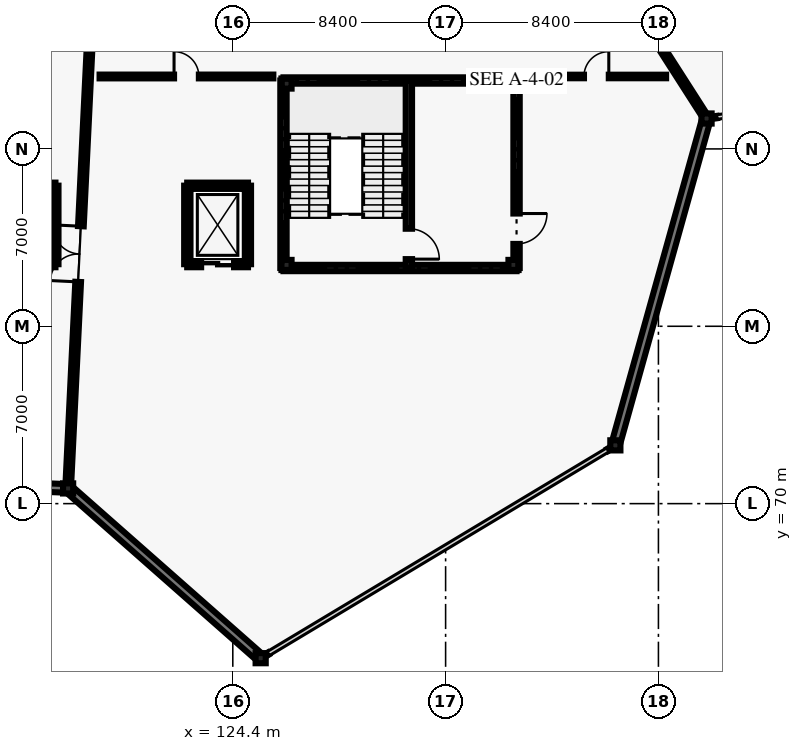
"""IFC4 building model, lengths in metres.
Left out: names, types, materials, properties, quantities, classifications, styles, units other than length and angle.
Written with IfcOpenShell. Run it as: python <this file> out.ifc"""

import sys

from ifc_helpers import new_model, si_unit, direction, frame, frame_2d, origin, origin_2d, place, context, subcontext, project, spatial, rectangle, i_section, extrude, element, fill, save


model = new_model("IFC4")
c1 = context("Model", 3, precision=1e-05, world=origin(), true_north=direction((0.0, 1.0)))
c2 = subcontext(c1, "Body", "Model", "MODEL_VIEW")
j1 = project(units=[si_unit("LENGTHUNIT", "METRE"), si_unit("PLANEANGLEUNIT", "RADIAN")], contexts=[c1])
p1 = place(None, origin())
s1 = spatial("IfcSite", under=j1, at=p1, CompositionType="ELEMENT")
p2 = place(p1, origin())
s2 = spatial("IfcBuilding", under=s1, at=p2, CompositionType="ELEMENT")
p3 = place(p2, frame((0.0, 0.0, 5.4)))
s3 = spatial("IfcBuildingStorey", under=s2, at=p3, CompositionType="ELEMENT", Elevation=5.4)
for number, where, z_axis, x_axis in (
    (1, (117.9, 70.6, 0.0), (0.0, 0.0, 1.0), (1.0, 0.0, 0.0)),
    (2, (125.5, 63.9, 0.0), (0.0, 0.0, 1.0), (1.0, 0.0, 0.0)),
    (3, (139.5, 72.3, 0.0), (0.0, 0.0, 1.0), (1.0, 0.0, 0.0)),
    (4, (143.1, 85.2, 0.0), (0.0, 0.0, 1.0), (1.0, 0.0, 0.0)),
    (5, (126.52, 79.42, 0.0), (0.0, 0.0, 1.0), (1.0, 0.0, 0.0)),
    (6, (135.48, 79.42, 0.0), (0.0, 0.0, 1.0), (1.0, 0.0, 0.0)),
    (7, (135.48, 86.58, 0.0), (0.0, 0.0, 1.0), (1.0, 0.0, 0.0)),
    (8, (126.52, 86.58, 0.0), (0.0, 0.0, 1.0), (1.0, 0.0, 0.0)),
):
    element("IfcColumn", number, at=place(p3, frame(where, z_axis=z_axis, x_axis=x_axis)), inside=s3, PredefinedType="COLUMN", context=c2, shape_type="SweptSolid", body=[
        extrude(i_section(OverallWidth=0.4, OverallDepth=0.4, WebThickness=0.022, FlangeThickness=0.036, at=origin_2d()), origin(), (0.0, 0.0, 1.0), 4.8),
    ])
p4 = place(p3, frame((117.84, 70.602, 0.0), z_axis=(0.0, 0.0, 1.0), x_axis=(-0.999284381651, 0.037824920194, 0.0)))
e9 = element("IfcWall", 9, at=p4, inside=s3, PredefinedType="SOLIDWALL", context=c2, shape_type="SweptSolid", body=[
    extrude(rectangle(XDim=18.453, YDim=0.34, at=frame_2d((9.227, 0.0))), origin(), (0.0, 0.0, 1.0), 3.62),
])
p5 = place(p3, frame((125.5, 63.9, 0.0), z_axis=(0.0, 0.0, 1.0), x_axis=(-0.750131359252, 0.661288850554, 0.0)))
e10 = element("IfcWall", 10, at=p5, inside=s3, PredefinedType="SOLIDWALL", context=c2, shape_type="SweptSolid", body=[
    extrude(rectangle(XDim=10.072, YDim=0.34, at=frame_2d((5.036, 0.0))), origin(), (0.0, 0.0, 1.0), 3.62),
])
for number, where, z_axis, x_axis in (
    (11, (139.464, 72.278, 0.0), (0.0, 0.0, 1.0), (-0.858, -0.513, 0.0)),
    (12, (125.8, 64.08, 0.0), (0.0, 0.0, 1.0), (-0.858, -0.513, 0.0)),
):
    element("IfcWall", number, at=place(p3, frame(where, z_axis=z_axis, x_axis=x_axis)), inside=s3, PredefinedType="SOLIDWALL", context=c2, shape_type="SweptSolid", body=[
        extrude(rectangle(XDim=0.308, YDim=0.095, at=frame_2d((0.154, 0.0))), origin(), (0.0, 0.0, 1.0), 3.62),
    ])
p6 = place(p3, frame((143.084, 85.142, 0.0), z_axis=(0.0, 0.0, 1.0), x_axis=(-0.268810029922, -0.963193214165, 0.0)))
e13 = element("IfcWall", 13, at=p6, inside=s3, PredefinedType="SOLIDWALL", context=c2, shape_type="SweptSolid", body=[
    extrude(rectangle(XDim=13.333, YDim=0.34, at=frame_2d((6.667, 0.0))), origin(), (0.0, 0.0, 1.0), 3.62),
])
p7 = place(p3, frame((143.506, 85.257, 0.0), z_axis=(0.0, 0.0, 1.0), x_axis=(-0.990232667812, -0.139424759628, 0.0)))
e14 = element("IfcWall", 14, at=p7, inside=s3, PredefinedType="SOLIDWALL", context=c2, shape_type="SweptSolid", body=[
    extrude(rectangle(XDim=0.308, YDim=0.095, at=frame_2d((0.154, 0.0))), origin(), (0.0, 0.0, 1.0), 3.62),
])
p8 = place(p3, frame((117.9, 70.6, 0.0), z_axis=(0.0, 0.0, 1.0), x_axis=(0.048599072515, 0.998818366947, 0.0)))
e15 = element("IfcWall", 15, at=p8, inside=s3, PredefinedType="SOLIDWALL", context=c2, shape_type="SweptSolid", body=[
    extrude(rectangle(XDim=18.522, YDim=0.225, at=frame_2d((9.261, 0.0))), origin(), (0.0, 0.0, 1.0), 4.02),
])
p9 = place(p8, frame((8.161, 0.0, 0.0)))
e16 = element("IfcOpeningElement", 16, at=p9, cuts=e15, PredefinedType="OPENING", context=c2, shape_type="SweptSolid", body=[
    extrude(rectangle(XDim=2.2, YDim=2.6, at=frame_2d((1.1, 1.3))), frame((0.0, 0.123, 0.0), z_axis=(0.0, -1.0, 0.0), x_axis=(1.0, 0.0, 0.0)), (0.0, 0.0, 1.0), 0.245),
])
p10 = place(p3, frame((143.1, 85.2, 0.0), z_axis=(0.0, 0.0, 1.0), x_axis=(-0.539434641352, 0.842027474439, 0.0)))
e17 = element("IfcWall", 17, at=p10, inside=s3, PredefinedType="SOLIDWALL", context=c2, shape_type="SweptSolid", body=[
    extrude(rectangle(XDim=15.201, YDim=0.225, at=frame_2d((7.601, 0.0))), origin(), (0.0, 0.0, 1.0), 4.02),
])
p11 = place(p10, frame((6.501, 0.0, 0.0)))
e18 = element("IfcOpeningElement", 18, at=p11, cuts=e17, PredefinedType="OPENING", context=c2, shape_type="SweptSolid", body=[
    extrude(rectangle(XDim=2.2, YDim=2.6, at=frame_2d((1.1, 1.3))), frame((0.0, 0.123, 0.0), z_axis=(0.0, -1.0, 0.0), x_axis=(1.0, 0.0, 0.0)), (0.0, 0.0, 1.0), 0.245),
])
p12 = place(p3, frame((119.142, 86.859, 0.0), z_axis=(0.0, 0.0, 1.0), x_axis=(1.0, 0.0, 0.0)))
e19 = element("IfcWall", 19, at=p12, inside=s3, PredefinedType="PARTITIONING", context=c2, shape_type="SweptSolid", body=[
    extrude(rectangle(XDim=6.858, YDim=0.15, at=frame_2d((3.429, 0.0))), origin(), (0.0, 0.0, 1.0), 3.32),
])
p13 = place(p12, frame((2.939, 0.0, 0.0)))
e20 = element("IfcOpeningElement", 20, at=p13, cuts=e19, PredefinedType="OPENING", context=c2, shape_type="SweptSolid", body=[
    extrude(rectangle(XDim=0.98, YDim=2.15, at=frame_2d((0.49, 1.075))), frame((0.0, 0.085, 0.0), z_axis=(0.0, -1.0, 0.0), x_axis=(1.0, 0.0, 0.0)), (0.0, 0.0, 1.0), 0.17),
])
p14 = place(p3, frame((136.0, 86.859, 0.0), z_axis=(0.0, 0.0, 1.0), x_axis=(1.0, 0.0, 0.0)))
e21 = element("IfcWall", 21, at=p14, inside=s3, PredefinedType="PARTITIONING", context=c2, shape_type="SweptSolid", body=[
    extrude(rectangle(XDim=5.503, YDim=0.14, at=frame_2d((2.751, 0.0))), origin(), (0.0, 0.0, 1.0), 3.32),
])
p15 = place(p14, frame((2.261, 0.0, 0.0)))
e22 = element("IfcOpeningElement", 22, at=p15, cuts=e21, PredefinedType="OPENING", context=c2, shape_type="SweptSolid", body=[
    extrude(rectangle(XDim=0.98, YDim=2.15, at=frame_2d((0.49, 1.075))), frame((0.0, 0.08, 0.0), z_axis=(0.0, -1.0, 0.0), x_axis=(1.0, 0.0, 0.0)), (0.0, 0.0, 1.0), 0.16),
])
p16 = place(p3, frame((126.4, 79.3, 0.0), z_axis=(0.0, 0.0, 1.0), x_axis=(0.0, 1.0, 0.0)))
e23 = element("IfcWall", 23, at=p16, inside=s3, PredefinedType="SHEAR", context=c2, shape_type="SweptSolid", body=[
    extrude(rectangle(XDim=7.4, YDim=0.25, at=frame_2d((3.7, 0.0))), origin(), (0.0, 0.0, 1.0), 4.56),
])
for number, where, z_axis, x_axis in (
    (24, (126.4, 86.7, 0.0), (0.0, 0.0, 1.0), (1.0, 0.0, 0.0)),
    (25, (135.6, 79.3, 0.0), (0.0, 0.0, 1.0), (-1.0, 0.0, 0.0)),
):
    element("IfcWall", number, at=place(p3, frame(where, z_axis=z_axis, x_axis=x_axis)), inside=s3, PredefinedType="SHEAR", context=c2, shape_type="SweptSolid", body=[
        extrude(rectangle(XDim=9.2, YDim=0.25, at=frame_2d((4.6, 0.0))), origin(), (0.0, 0.0, 1.0), 4.56),
    ])
p17 = place(p3, frame((135.6, 86.7, 0.0), z_axis=(0.0, 0.0, 1.0), x_axis=(0.0, -1.0, 0.0)))
e26 = element("IfcWall", 26, at=p17, inside=s3, PredefinedType="SHEAR", context=c2, shape_type="SweptSolid", body=[
    extrude(rectangle(XDim=7.4, YDim=0.25, at=frame_2d((3.7, 0.0))), origin(), (0.0, 0.0, 1.0), 4.56),
])
p18 = place(p17, frame((5.25, 0.0, 0.0)))
e27 = element("IfcOpeningElement", 27, at=p18, cuts=e26, PredefinedType="OPENING", context=c2, shape_type="SweptSolid", body=[
    extrude(rectangle(XDim=1.2, YDim=2.2, at=frame_2d((0.6, 1.1))), frame((0.0, 0.135, 0.0), z_axis=(0.0, -1.0, 0.0), x_axis=(1.0, 0.0, 0.0)), (0.0, 0.0, 1.0), 0.27),
])
p19 = place(p3, frame((131.35, 86.7, 0.0), z_axis=(0.0, 0.0, 1.0), x_axis=(0.0, -1.0, 0.0)))
e28 = element("IfcWall", 28, at=p19, inside=s3, PredefinedType="SHEAR", context=c2, shape_type="SweptSolid", body=[
    extrude(rectangle(XDim=7.4, YDim=0.25, at=frame_2d((3.7, 0.0))), origin(), (0.0, 0.0, 1.0), 4.56),
])
p20 = place(p19, frame((5.85, 0.0, 0.0)))
e29 = element("IfcOpeningElement", 29, at=p20, cuts=e28, PredefinedType="OPENING", context=c2, shape_type="SweptSolid", body=[
    extrude(rectangle(XDim=1.2, YDim=2.2, at=frame_2d((0.6, 1.1))), frame((0.0, 0.135, 0.0), z_axis=(0.0, -1.0, 0.0), x_axis=(1.0, 0.0, 0.0)), (0.0, 0.0, 1.0), 0.27),
])
p21 = place(p3, frame((115.0, 82.55, 0.0), z_axis=(0.0, 0.0, 1.0), x_axis=(1.0, 0.0, 0.0)))
e30 = element("IfcWall", 30, at=p21, inside=s3, PredefinedType="SHEAR", context=c2, shape_type="SweptSolid", body=[
    extrude(rectangle(XDim=2.4, YDim=0.24, at=frame_2d((1.2, 0.0))), origin(), (0.0, 0.0, 1.0), 4.56),
])
p22 = place(p3, frame((117.4, 82.55, 0.0), z_axis=(0.0, 0.0, 1.0), x_axis=(0.0, -1.0, 0.0)))
e31 = element("IfcWall", 31, at=p22, inside=s3, PredefinedType="SHEAR", context=c2, shape_type="SweptSolid", body=[
    extrude(rectangle(XDim=3.1, YDim=0.24, at=frame_2d((1.55, 0.0))), origin(), (0.0, 0.0, 1.0), 4.56),
])
p23 = place(p3, frame((117.4, 79.45, 0.0), z_axis=(0.0, 0.0, 1.0), x_axis=(-1.0, 0.0, 0.0)))
e32 = element("IfcWall", 32, at=p23, inside=s3, PredefinedType="SHEAR", context=c2, shape_type="SweptSolid", body=[
    extrude(rectangle(XDim=2.4, YDim=0.24, at=frame_2d((1.2, 0.0))), origin(), (0.0, 0.0, 1.0), 4.56),
])
p24 = place(p23, frame((0.55, 0.0, 0.0)))
e33 = element("IfcOpeningElement", 33, at=p24, cuts=e32, PredefinedType="OPENING", context=c2, shape_type="SweptSolid", body=[
    extrude(rectangle(XDim=1.3, YDim=2.25, at=frame_2d((0.65, 1.125))), frame((0.0, 0.13, 0.0), z_axis=(0.0, -1.0, 0.0), x_axis=(1.0, 0.0, 0.0)), (0.0, 0.0, 1.0), 0.26),
])
p25 = place(p3, frame((122.6, 82.55, 0.0), z_axis=(0.0, 0.0, 1.0), x_axis=(1.0, 0.0, 0.0)))
e34 = element("IfcWall", 34, at=p25, inside=s3, PredefinedType="SHEAR", context=c2, shape_type="SweptSolid", body=[
    extrude(rectangle(XDim=2.4, YDim=0.24, at=frame_2d((1.2, 0.0))), origin(), (0.0, 0.0, 1.0), 4.56),
])
for number, where, z_axis, x_axis in (
    (35, (125.0, 82.55, 0.0), (0.0, 0.0, 1.0), (0.0, -1.0, 0.0)),
    (36, (122.6, 79.45, 0.0), (0.0, 0.0, 1.0), (0.0, 1.0, 0.0)),
):
    element("IfcWall", number, at=place(p3, frame(where, z_axis=z_axis, x_axis=x_axis)), inside=s3, PredefinedType="SHEAR", context=c2, shape_type="SweptSolid", body=[
        extrude(rectangle(XDim=3.1, YDim=0.24, at=frame_2d((1.55, 0.0))), origin(), (0.0, 0.0, 1.0), 4.56),
    ])
p26 = place(p3, frame((125.0, 79.45, 0.0), z_axis=(0.0, 0.0, 1.0), x_axis=(-1.0, 0.0, 0.0)))
e37 = element("IfcWall", 37, at=p26, inside=s3, PredefinedType="SHEAR", context=c2, shape_type="SweptSolid", body=[
    extrude(rectangle(XDim=2.4, YDim=0.24, at=frame_2d((1.2, 0.0))), origin(), (0.0, 0.0, 1.0), 4.56),
])
p27 = place(p26, frame((0.55, 0.0, 0.0)))
e38 = element("IfcOpeningElement", 38, at=p27, cuts=e37, PredefinedType="OPENING", context=c2, shape_type="SweptSolid", body=[
    extrude(rectangle(XDim=1.3, YDim=2.25, at=frame_2d((0.65, 1.125))), frame((0.0, 0.13, 0.0), z_axis=(0.0, -1.0, 0.0), x_axis=(1.0, 0.0, 0.0)), (0.0, 0.0, 1.0), 0.26),
])
p28 = place(p9, origin())
e39 = element("IfcDoor", 39, at=p28, inside=s3, OperationType="DOUBLE_DOOR_SINGLE_SWING", PredefinedType="DOOR", context=c2, shape_type="SweptSolid", body=[
    extrude(rectangle(XDim=2.2, YDim=2.6, at=frame_2d((1.1, 1.3))), frame((0.0, 0.025, 0.0), z_axis=(0.0, -1.0, 0.0), x_axis=(1.0, 0.0, 0.0)), (0.0, 0.0, 1.0), 0.05),
])
fill(e16, e39)
p29 = place(p13, origin())
e40 = element("IfcDoor", 40, at=p29, inside=s3, OperationType="SINGLE_SWING_LEFT", PredefinedType="DOOR", context=c2, shape_type="SweptSolid", body=[
    extrude(rectangle(XDim=0.98, YDim=2.15, at=frame_2d((0.49, 1.075))), frame((0.0, 0.025, 0.0), z_axis=(0.0, -1.0, 0.0), x_axis=(1.0, 0.0, 0.0)), (0.0, 0.0, 1.0), 0.05),
])
fill(e20, e40)
p30 = place(p15, origin())
e41 = element("IfcDoor", 41, at=p30, inside=s3, OperationType="SINGLE_SWING_RIGHT", PredefinedType="DOOR", context=c2, shape_type="SweptSolid", body=[
    extrude(rectangle(XDim=0.98, YDim=2.15, at=frame_2d((0.49, 1.075))), frame((0.0, 0.025, 0.0), z_axis=(0.0, -1.0, 0.0), x_axis=(1.0, 0.0, 0.0)), (0.0, 0.0, 1.0), 0.05),
])
fill(e22, e41)
p31 = place(p18, origin())
e42 = element("IfcDoor", 42, at=p31, inside=s3, OperationType="SINGLE_SWING_LEFT", PredefinedType="DOOR", context=c2, shape_type="SweptSolid", body=[
    extrude(rectangle(XDim=1.2, YDim=2.2, at=frame_2d((0.6, 1.1))), frame((0.0, 0.025, 0.0), z_axis=(0.0, -1.0, 0.0), x_axis=(1.0, 0.0, 0.0)), (0.0, 0.0, 1.0), 0.05),
])
fill(e27, e42)
p32 = place(p20, origin())
e43 = element("IfcDoor", 43, at=p32, inside=s3, OperationType="SINGLE_SWING_RIGHT", PredefinedType="DOOR", context=c2, shape_type="SweptSolid", body=[
    extrude(rectangle(XDim=1.2, YDim=2.2, at=frame_2d((0.6, 1.1))), frame((0.0, 0.025, 0.0), z_axis=(0.0, -1.0, 0.0), x_axis=(1.0, 0.0, 0.0)), (0.0, 0.0, 1.0), 0.05),
])
fill(e29, e43)
p33 = place(p27, origin())
e44 = element("IfcDoor", 44, at=p33, inside=s3, OperationType="SLIDING_TO_LEFT", PredefinedType="DOOR", context=c2, shape_type="SweptSolid", body=[
    extrude(rectangle(XDim=1.3, YDim=2.25, at=frame_2d((0.65, 1.125))), frame((0.0, 0.025, 0.0), z_axis=(0.0, -1.0, 0.0), x_axis=(1.0, 0.0, 0.0)), (0.0, 0.0, 1.0), 0.05),
])
fill(e38, e44)
save(model, sys.argv[1])
